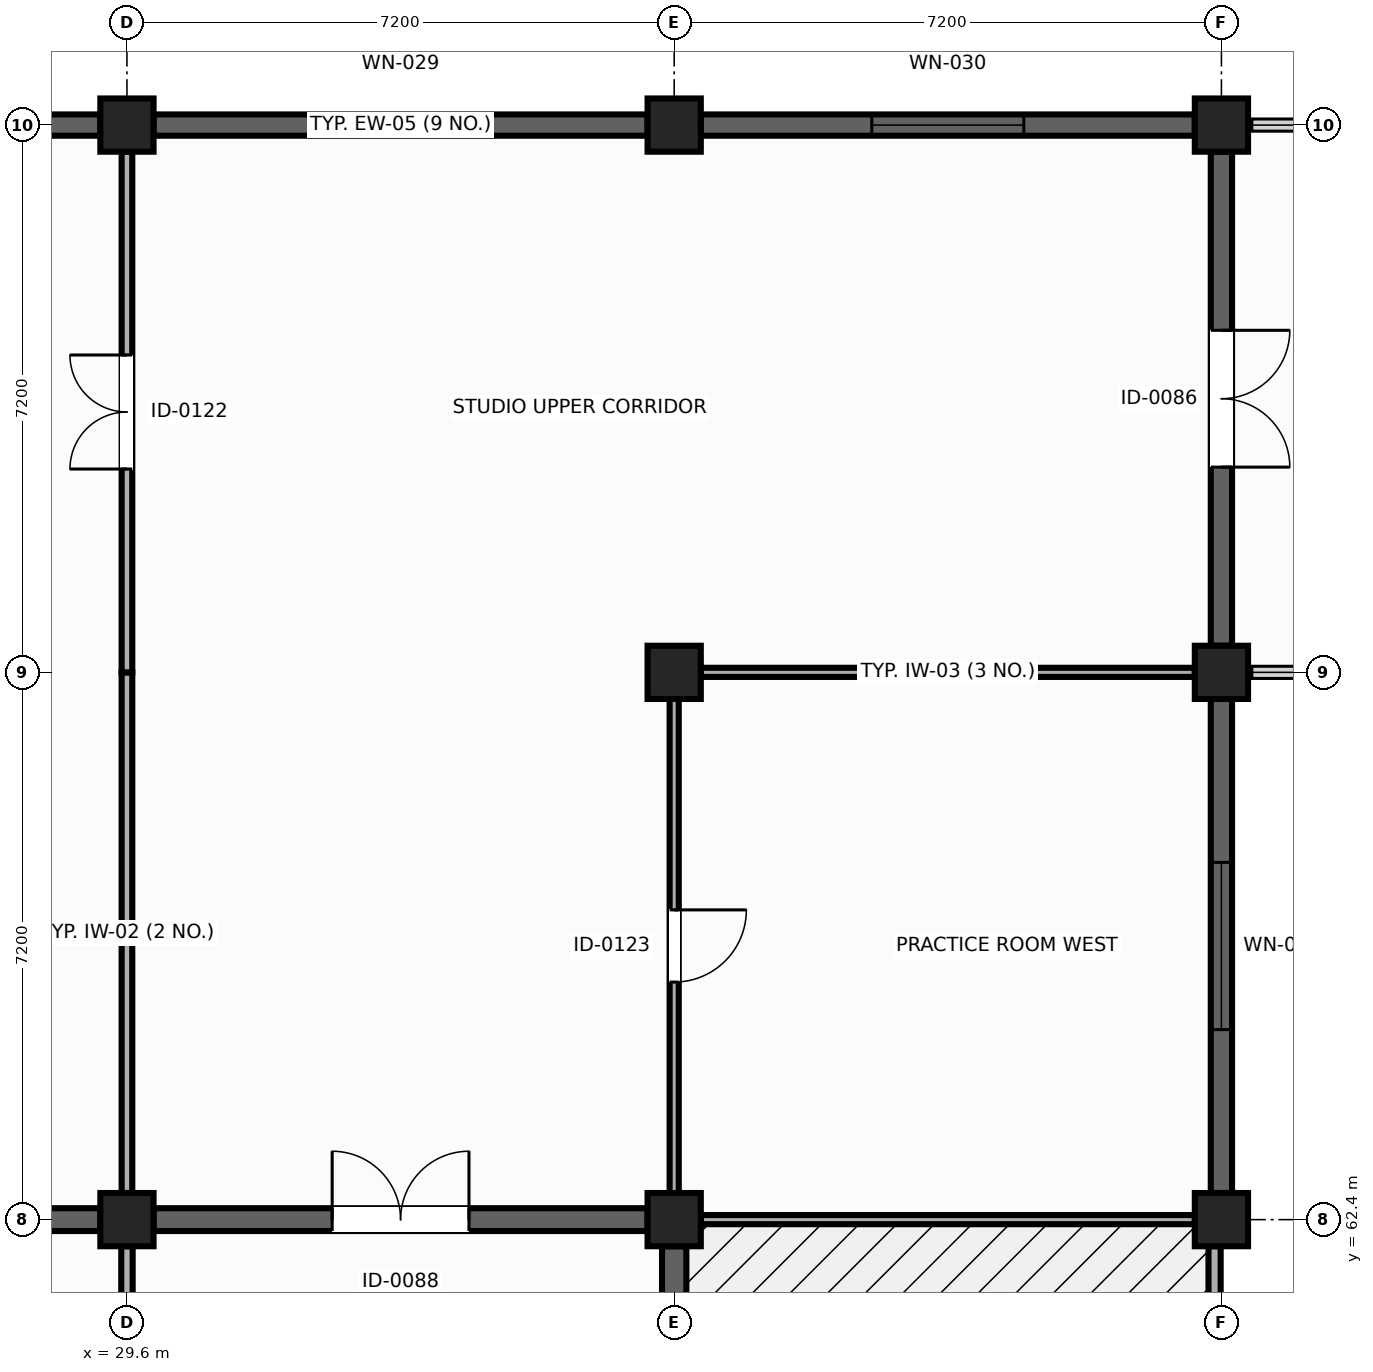
"""IFC4 building model, lengths in metres.
Left out: names, types, materials, properties, quantities, classifications, styles, units other than length and angle.
Written with IfcOpenShell. Run it as: python <this file> out.ifc"""

import sys

from ifc_helpers import new_model, si_unit, direction, frame, frame_2d, origin, origin_2d, place, context, subcontext, project, spatial, rectangle, extrude, element, fill, save


model = new_model("IFC4")
c1 = context("Model", 3, precision=1e-05, world=origin(), true_north=direction((0.0, 1.0)))
c2 = subcontext(c1, "Body", "Model", "MODEL_VIEW")
j1 = project(units=[si_unit("LENGTHUNIT", "METRE"), si_unit("PLANEANGLEUNIT", "RADIAN")], contexts=[c1])
p1 = place(None, origin())
s1 = spatial("IfcSite", under=j1, at=p1, CompositionType="ELEMENT")
p2 = place(p1, origin())
s2 = spatial("IfcBuilding", under=s1, at=p2, CompositionType="ELEMENT")
p3 = place(p2, frame((0.0, 0.0, 5.4)))
s3 = spatial("IfcBuildingStorey", under=s2, at=p3, CompositionType="ELEMENT", Elevation=5.4)
for number, where, z_axis, x_axis in (
    (1, (29.6, 62.4, 0.0), (0.0, 0.0, 1.0), (1.0, 0.0, 0.0)),
    (2, (36.8, 62.4, 0.0), (0.0, 0.0, 1.0), (0.0, 1.0, 0.0)),
):
    element("IfcColumn", number, at=place(p3, frame(where, z_axis=z_axis, x_axis=x_axis)), inside=s3, PredefinedType="COLUMN", context=c2, shape_type="SweptSolid", body=[
        extrude(rectangle(XDim=0.7, YDim=0.7, at=origin_2d()), origin(), (0.0, 0.0, 1.0), 4.28),
    ])
p4 = place(p3, frame((44.0, 62.4, 0.0), z_axis=(0.0, 0.0, 1.0), x_axis=(1.0, 0.0, 0.0)))
e3 = element("IfcColumn", 3, at=p4, inside=s3, PredefinedType="COLUMN", context=c2, shape_type="SweptSolid", body=[
    extrude(rectangle(XDim=0.7, YDim=0.7, at=origin_2d()), origin(), (0.0, 0.0, 1.0), 4.334),
])
p5 = place(p3, frame((36.8, 69.6, 0.0), z_axis=(0.0, 0.0, 1.0), x_axis=(1.0, 0.0, 0.0)))
e4 = element("IfcColumn", 4, at=p5, inside=s3, PredefinedType="COLUMN", context=c2, shape_type="SweptSolid", body=[
    extrude(rectangle(XDim=0.7, YDim=0.7, at=origin_2d()), origin(), (0.0, 0.0, 1.0), 6.234),
])
p6 = place(p3, frame((44.0, 69.6, 0.0), z_axis=(0.0, 0.0, 1.0), x_axis=(0.0, 1.0, 0.0)))
e5 = element("IfcColumn", 5, at=p6, inside=s3, PredefinedType="COLUMN", context=c2, shape_type="SweptSolid", body=[
    extrude(rectangle(XDim=0.7, YDim=0.7, at=origin_2d()), origin(), (0.0, 0.0, 1.0), 4.28),
])
for number, where, z_axis, x_axis in (
    (6, (29.6, 76.8, 0.0), (0.0, 0.0, 1.0), (1.0, 0.0, 0.0)),
    (7, (36.8, 76.8, 0.0), (0.0, 0.0, 1.0), (0.0, 1.0, 0.0)),
):
    element("IfcColumn", number, at=place(p3, frame(where, z_axis=z_axis, x_axis=x_axis)), inside=s3, PredefinedType="COLUMN", context=c2, shape_type="SweptSolid", body=[
        extrude(rectangle(XDim=0.7, YDim=0.7, at=origin_2d()), origin(), (0.0, 0.0, 1.0), 4.334),
    ])
p7 = place(p3, frame((44.0, 76.8, 0.0), z_axis=(0.0, 0.0, 1.0), x_axis=(1.0, 0.0, 0.0)))
e8 = element("IfcColumn", 8, at=p7, inside=s3, PredefinedType="COLUMN", context=c2, shape_type="SweptSolid", body=[
    extrude(rectangle(XDim=0.7, YDim=0.7, at=origin_2d()), origin(), (0.0, 0.0, 1.0), 4.28),
])
p8 = place(p3, frame((36.8, 62.05, 0.0), z_axis=(0.0, 0.0, 1.0), x_axis=(0.0, -1.0, 0.0)))
e9 = element("IfcWall", 9, at=p8, inside=s3, PredefinedType="SOLIDWALL", context=c2, shape_type="SweptSolid", body=[
    extrude(rectangle(XDim=6.5, YDim=0.32, at=frame_2d((3.25, 0.0))), origin(), (0.0, 0.0, 1.0), 4.28),
])
p9 = place(p3, frame((22.75, 76.8, 0.0), z_axis=(0.0, 0.0, 1.0), x_axis=(1.0, 0.0, 0.0)))
e10 = element("IfcWall", 10, at=p9, inside=s3, PredefinedType="SOLIDWALL", context=c2, shape_type="SweptSolid", body=[
    extrude(rectangle(XDim=6.5, YDim=0.28, at=frame_2d((3.25, 0.0))), origin(), (0.0, 0.0, 1.0), 4.334),
])
p10 = place(p3, frame((29.95, 76.8, 0.0), z_axis=(0.0, 0.0, 1.0), x_axis=(1.0, 0.0, 0.0)))
e11 = element("IfcWall", 11, at=p10, inside=s3, PredefinedType="SOLIDWALL", context=c2, shape_type="SweptSolid", body=[
    extrude(rectangle(XDim=6.5, YDim=0.28, at=frame_2d((3.25, 0.0))), origin(), (0.0, 0.0, 1.0), 4.334),
])
p11 = place(p10, frame((2.35, 0.0, 0.9)))
e12 = element("IfcOpeningElement", 12, at=p11, cuts=e11, PredefinedType="OPENING", context=c2, shape_type="SweptSolid", body=[
    extrude(rectangle(XDim=1.8, YDim=1.8, at=frame_2d((0.9, 0.9))), frame((0.0, 0.15, 0.0), z_axis=(0.0, -1.0, 0.0), x_axis=(1.0, 0.0, 0.0)), (0.0, 0.0, 1.0), 0.3),
])
p12 = place(p3, frame((37.15, 76.8, 0.0), z_axis=(0.0, 0.0, 1.0), x_axis=(1.0, 0.0, 0.0)))
e13 = element("IfcWall", 13, at=p12, inside=s3, PredefinedType="SOLIDWALL", context=c2, shape_type="SweptSolid", body=[
    extrude(rectangle(XDim=6.5, YDim=0.28, at=frame_2d((3.25, 0.0))), origin(), (0.0, 0.0, 1.0), 4.334),
])
p13 = place(p12, frame((2.25, 0.0, 0.9)))
e14 = element("IfcOpeningElement", 14, at=p13, cuts=e13, PredefinedType="OPENING", context=c2, shape_type="SweptSolid", body=[
    extrude(rectangle(XDim=2.0, YDim=1.8, at=frame_2d((1.0, 0.9))), frame((0.0, 0.15, 0.0), z_axis=(0.0, -1.0, 0.0), x_axis=(1.0, 0.0, 0.0)), (0.0, 0.0, 1.0), 0.3),
])
p14 = place(p3, frame((44.0, 76.45, 0.0), z_axis=(0.0, 0.0, 1.0), x_axis=(0.0, -1.0, 0.0)))
e15 = element("IfcWall", 15, at=p14, inside=s3, PredefinedType="SOLIDWALL", context=c2, shape_type="SweptSolid", body=[
    extrude(rectangle(XDim=6.5, YDim=0.28, at=frame_2d((3.25, 0.0))), origin(), (0.0, 0.0, 1.0), 4.28),
])
p15 = place(p14, frame((2.35, 0.0, 0.0)))
e16 = element("IfcOpeningElement", 16, at=p15, cuts=e15, PredefinedType="OPENING", context=c2, shape_type="SweptSolid", body=[
    extrude(rectangle(XDim=1.8, YDim=2.3, at=frame_2d((0.9, 1.15))), frame((0.0, 0.15, 0.0), z_axis=(0.0, -1.0, 0.0), x_axis=(1.0, 0.0, 0.0)), (0.0, 0.0, 1.0), 0.3),
])
p16 = place(p3, frame((44.0, 69.25, 0.0), z_axis=(0.0, 0.0, 1.0), x_axis=(0.0, -1.0, 0.0)))
e17 = element("IfcWall", 17, at=p16, inside=s3, PredefinedType="SOLIDWALL", context=c2, shape_type="SweptSolid", body=[
    extrude(rectangle(XDim=6.5, YDim=0.28, at=frame_2d((3.25, 0.0))), origin(), (0.0, 0.0, 1.0), 4.5),
])
p17 = place(p16, frame((2.15, 0.0, 0.9)))
e18 = element("IfcOpeningElement", 18, at=p17, cuts=e17, PredefinedType="OPENING", context=c2, shape_type="SweptSolid", body=[
    extrude(rectangle(XDim=2.2, YDim=1.8, at=frame_2d((1.1, 0.9))), frame((0.0, 0.15, 0.0), z_axis=(0.0, -1.0, 0.0), x_axis=(1.0, 0.0, 0.0)), (0.0, 0.0, 1.0), 0.3),
])
p18 = place(p3, frame((43.91, 48.09, 0.0), z_axis=(0.0, 0.0, 1.0), x_axis=(0.0, 1.0, 0.0)))
e19 = element("IfcWall", 19, at=p18, inside=s3, PredefinedType="PARAPET", context=c2, shape_type="SweptSolid", body=[
    extrude(rectangle(XDim=13.96, YDim=0.16, at=frame_2d((6.98, 0.0))), origin(), (0.0, 0.0, 1.0), 1.15),
])
p19 = place(p3, frame((22.75, 62.4, 0.0), z_axis=(0.0, 0.0, 1.0), x_axis=(1.0, 0.0, 0.0)))
e20 = element("IfcWall", 20, at=p19, inside=s3, PredefinedType="SHEAR", context=c2, shape_type="SweptSolid", body=[
    extrude(rectangle(XDim=6.5, YDim=0.3, at=frame_2d((3.25, 0.0))), origin(), (0.0, 0.0, 1.0), 4.28),
])
p20 = place(p19, frame((2.15, 0.0, 1.1)))
e21 = element("IfcOpeningElement", 21, at=p20, cuts=e20, PredefinedType="OPENING", context=c2, shape_type="SweptSolid", body=[
    extrude(rectangle(XDim=2.2, YDim=1.3, at=frame_2d((1.1, 0.65))), frame((0.0, 0.16, 0.0), z_axis=(0.0, -1.0, 0.0), x_axis=(1.0, 0.0, 0.0)), (0.0, 0.0, 1.0), 0.32),
])
p21 = place(p3, frame((29.95, 62.4, 0.0), z_axis=(0.0, 0.0, 1.0), x_axis=(1.0, 0.0, 0.0)))
e22 = element("IfcWall", 22, at=p21, inside=s3, PredefinedType="SHEAR", context=c2, shape_type="SweptSolid", body=[
    extrude(rectangle(XDim=6.5, YDim=0.3, at=frame_2d((3.25, 0.0))), origin(), (0.0, 0.0, 1.0), 4.28),
])
p22 = place(p21, frame((2.35, 0.0, 0.0)))
e23 = element("IfcOpeningElement", 23, at=p22, cuts=e22, PredefinedType="OPENING", context=c2, shape_type="SweptSolid", body=[
    extrude(rectangle(XDim=1.8, YDim=2.3, at=frame_2d((0.9, 1.15))), frame((0.0, 0.16, 0.0), z_axis=(0.0, -1.0, 0.0), x_axis=(1.0, 0.0, 0.0)), (0.0, 0.0, 1.0), 0.32),
])
p23 = place(p3, frame((29.6, 55.55, 0.0), z_axis=(0.0, 0.0, 1.0), x_axis=(0.0, 1.0, 0.0)))
e24 = element("IfcWall", 24, at=p23, inside=s3, PredefinedType="PARTITIONING", context=c2, shape_type="SweptSolid", body=[
    extrude(rectangle(XDim=6.5, YDim=0.15, at=frame_2d((3.25, 0.0))), origin(), (0.0, 0.0, 1.0), 3.575),
])
p24 = place(p3, frame((29.6, 62.75, 0.0), z_axis=(0.0, 0.0, 1.0), x_axis=(0.0, 1.0, 0.0)))
e25 = element("IfcWall", 25, at=p24, inside=s3, PredefinedType="PARTITIONING", context=c2, shape_type="SweptSolid", body=[
    extrude(rectangle(XDim=6.85, YDim=0.14, at=frame_2d((3.425, 0.0))), origin(), (0.0, 0.0, 1.0), 5.33),
])
p25 = place(p3, frame((29.6, 69.6, 0.0), z_axis=(0.0, 0.0, 1.0), x_axis=(0.0, 1.0, 0.0)))
e26 = element("IfcWall", 26, at=p25, inside=s3, PredefinedType="PARTITIONING", context=c2, shape_type="SweptSolid", body=[
    extrude(rectangle(XDim=6.85, YDim=0.14, at=frame_2d((3.425, 0.0))), origin(), (0.0, 0.0, 1.0), 5.33),
])
p26 = place(p25, frame((2.675, 0.0, 0.0)))
e27 = element("IfcOpeningElement", 27, at=p26, cuts=e26, PredefinedType="OPENING", context=c2, shape_type="SweptSolid", body=[
    extrude(rectangle(XDim=1.5, YDim=2.2, at=frame_2d((0.75, 1.1))), frame((0.0, 0.08, 0.0), z_axis=(0.0, -1.0, 0.0), x_axis=(1.0, 0.0, 0.0)), (0.0, 0.0, 1.0), 0.16),
])
p27 = place(p3, frame((43.65, 69.6, 0.0), z_axis=(0.0, 0.0, 1.0), x_axis=(-1.0, 0.0, 0.0)))
e28 = element("IfcWall", 28, at=p27, inside=s3, PredefinedType="PARTITIONING", context=c2, shape_type="SweptSolid", body=[
    extrude(rectangle(XDim=6.5, YDim=0.12, at=frame_2d((3.25, 0.0))), origin(), (0.0, 0.0, 1.0), 6.234),
])
p28 = place(p3, frame((36.8, 69.25, 0.0), z_axis=(0.0, 0.0, 1.0), x_axis=(0.0, -1.0, 0.0)))
e29 = element("IfcWall", 29, at=p28, inside=s3, PredefinedType="PARTITIONING", context=c2, shape_type="SweptSolid", body=[
    extrude(rectangle(XDim=6.5, YDim=0.12, at=frame_2d((3.25, 0.0))), origin(), (0.0, 0.0, 1.0), 5.284),
])
p29 = place(p28, frame((2.775, 0.0, 0.0)))
e30 = element("IfcOpeningElement", 30, at=p29, cuts=e29, PredefinedType="OPENING", context=c2, shape_type="SweptSolid", body=[
    extrude(rectangle(XDim=0.95, YDim=2.12, at=frame_2d((0.475, 1.06))), frame((0.0, 0.07, 0.0), z_axis=(0.0, -1.0, 0.0), x_axis=(1.0, 0.0, 0.0)), (0.0, 0.0, 1.0), 0.14),
])
p30 = place(p3, frame((37.15, 62.4, 0.0), z_axis=(0.0, 0.0, 1.0), x_axis=(1.0, 0.0, 0.0)))
e31 = element("IfcWall", 31, at=p30, inside=s3, PredefinedType="PARTITIONING", context=c2, shape_type="SweptSolid", body=[
    extrude(rectangle(XDim=6.5, YDim=0.12, at=frame_2d((3.25, 0.0))), origin(), (0.0, 0.0, 1.0), 4.334),
])
p31 = place(p11, origin())
e32 = element("IfcWindow", 32, at=p31, inside=s3, PartitioningType="SINGLE_PANEL", PredefinedType="WINDOW", context=c2, shape_type="SweptSolid", body=[
    extrude(rectangle(XDim=1.8, YDim=1.8, at=frame_2d((0.9, 0.9))), frame((0.0, 0.03, 0.0), z_axis=(0.0, -1.0, 0.0), x_axis=(1.0, 0.0, 0.0)), (0.0, 0.0, 1.0), 0.06),
])
fill(e12, e32)
p32 = place(p13, origin())
e33 = element("IfcWindow", 33, at=p32, inside=s3, PartitioningType="SINGLE_PANEL", PredefinedType="WINDOW", context=c2, shape_type="SweptSolid", body=[
    extrude(rectangle(XDim=2.0, YDim=1.8, at=frame_2d((1.0, 0.9))), frame((0.0, 0.03, 0.0), z_axis=(0.0, -1.0, 0.0), x_axis=(1.0, 0.0, 0.0)), (0.0, 0.0, 1.0), 0.06),
])
fill(e14, e33)
p33 = place(p17, origin())
e34 = element("IfcWindow", 34, at=p33, inside=s3, PartitioningType="SINGLE_PANEL", PredefinedType="WINDOW", context=c2, shape_type="SweptSolid", body=[
    extrude(rectangle(XDim=2.2, YDim=1.8, at=frame_2d((1.1, 0.9))), frame((0.0, 0.03, 0.0), z_axis=(0.0, -1.0, 0.0), x_axis=(1.0, 0.0, 0.0)), (0.0, 0.0, 1.0), 0.06),
])
fill(e18, e34)
p34 = place(p15, origin())
e35 = element("IfcDoor", 35, at=p34, inside=s3, OperationType="DOUBLE_DOOR_SINGLE_SWING", PredefinedType="DOOR", context=c2, shape_type="SweptSolid", body=[
    extrude(rectangle(XDim=1.8, YDim=2.3, at=frame_2d((0.9, 1.15))), frame((0.0, 0.025, 0.0), z_axis=(0.0, -1.0, 0.0), x_axis=(1.0, 0.0, 0.0)), (0.0, 0.0, 1.0), 0.05),
])
fill(e16, e35)
p35 = place(p22, origin())
e36 = element("IfcDoor", 36, at=p35, inside=s3, OperationType="DOUBLE_DOOR_SINGLE_SWING", PredefinedType="DOOR", context=c2, shape_type="SweptSolid", body=[
    extrude(rectangle(XDim=1.8, YDim=2.3, at=frame_2d((0.9, 1.15))), frame((0.0, 0.025, 0.0), z_axis=(0.0, -1.0, 0.0), x_axis=(1.0, 0.0, 0.0)), (0.0, 0.0, 1.0), 0.05),
])
fill(e23, e36)
p36 = place(p26, origin())
e37 = element("IfcDoor", 37, at=p36, inside=s3, OperationType="DOUBLE_DOOR_SINGLE_SWING", PredefinedType="DOOR", context=c2, shape_type="SweptSolid", body=[
    extrude(rectangle(XDim=1.5, YDim=2.2, at=frame_2d((0.75, 1.1))), frame((0.0, 0.025, 0.0), z_axis=(0.0, -1.0, 0.0), x_axis=(1.0, 0.0, 0.0)), (0.0, 0.0, 1.0), 0.05),
])
fill(e27, e37)
p37 = place(p29, origin())
e38 = element("IfcDoor", 38, at=p37, inside=s3, OperationType="SINGLE_SWING_LEFT", PredefinedType="DOOR", context=c2, shape_type="SweptSolid", body=[
    extrude(rectangle(XDim=0.95, YDim=2.12, at=frame_2d((0.475, 1.06))), frame((0.0, 0.025, 0.0), z_axis=(0.0, -1.0, 0.0), x_axis=(1.0, 0.0, 0.0)), (0.0, 0.0, 1.0), 0.05),
])
fill(e30, e38)
save(model, sys.argv[1])
